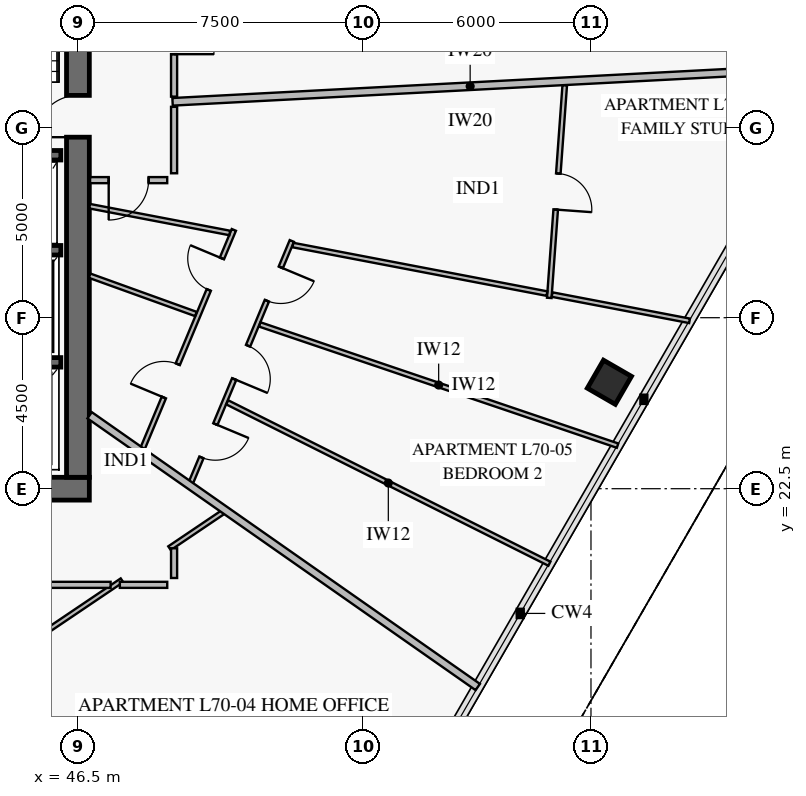
"""IFC4 building model, lengths in metres.
Left out: names, types, materials, properties, quantities, classifications, styles, units other than length and angle.
Written with IfcOpenShell. Run it as: python <this file> out.ifc"""

import sys

from ifc_helpers import new_model, si_unit, direction, frame, frame_2d, origin, origin_2d, place, context, subcontext, project, spatial, rectangle, extrude, element, fill, save


model = new_model("IFC4")
c1 = context("Model", 3, precision=1e-05, world=origin(), true_north=direction((0.0, 1.0)))
c2 = subcontext(c1, "Body", "Model", "MODEL_VIEW")
j1 = project(units=[si_unit("LENGTHUNIT", "METRE"), si_unit("PLANEANGLEUNIT", "RADIAN")], contexts=[c1])
p1 = place(None, origin())
s1 = spatial("IfcSite", under=j1, at=p1, CompositionType="ELEMENT")
p2 = place(p1, origin())
s2 = spatial("IfcBuilding", under=s1, at=p2, CompositionType="ELEMENT")
p3 = place(p2, frame((0.0, 0.0, 276.8)))
s3 = spatial("IfcBuildingStorey", under=s2, at=p3, CompositionType="ELEMENT", Elevation=276.8)
p4 = place(p3, frame((37.35, 22.5, 0.0), z_axis=(0.0, 0.0, 1.0), x_axis=(1.0, 0.0, 0.0)))
e1 = element("IfcWall", 1, at=p4, inside=s3, PredefinedType="SHEAR", context=c2, shape_type="SweptSolid", body=[
    extrude(rectangle(XDim=9.45, YDim=0.6, at=frame_2d((4.725, 0.0))), origin(), (0.0, 0.0, 1.0), 3.8),
])
p5 = place(p4, frame((3.95, 0.0, 0.0)))
e2 = element("IfcOpeningElement", 2, at=p5, cuts=e1, PredefinedType="OPENING", context=c2, shape_type="SweptSolid", body=[
    extrude(rectangle(XDim=1.5, YDim=2.15, at=frame_2d((0.75, 1.075))), frame((0.0, 0.312, 0.0), z_axis=(0.0, -1.0, 0.0), x_axis=(1.0, 0.0, 0.0)), (0.0, 0.0, 1.0), 0.624),
])
p6 = place(p3, frame((46.5, 22.8, 0.0), z_axis=(0.0, 0.0, 1.0), x_axis=(0.0, 1.0, 0.0)))
e3 = element("IfcWall", 3, at=p6, inside=s3, PredefinedType="SHEAR", context=c2, shape_type="SweptSolid", body=[
    extrude(rectangle(XDim=18.4, YDim=0.6, at=frame_2d((9.2, 0.0))), origin(), (0.0, 0.0, 1.0), 3.8),
])
p7 = place(p6, frame((8.95, 0.0, 0.0)))
e4 = element("IfcOpeningElement", 4, at=p7, cuts=e3, PredefinedType="OPENING", context=c2, shape_type="SweptSolid", body=[
    extrude(rectangle(XDim=1.1, YDim=2.15, at=frame_2d((0.55, 1.075))), frame((0.0, 0.312, 0.0), z_axis=(0.0, -1.0, 0.0), x_axis=(1.0, 0.0, 0.0)), (0.0, 0.0, 1.0), 0.624),
])
p8 = place(p3, frame((60.485, 25.301, 0.0), z_axis=(0.0, 0.0, 1.0), x_axis=(0.5, 0.866025403784, 0.0)))
e5 = element("IfcColumn", 5, at=p8, inside=s3, PredefinedType="COLUMN", context=c2, shape_type="SweptSolid", body=[
    extrude(rectangle(XDim=0.85, YDim=0.85, at=origin_2d()), origin(), (0.0, 0.0, 1.0), 3.55),
])
p9 = place(p3, frame((25.95, 31.275, 0.0), z_axis=(0.0, 0.0, 1.0), x_axis=(1.0, 0.0, 0.0)))
e6 = element("IfcWall", 6, at=p9, inside=s3, PredefinedType="SOLIDWALL", context=c2, shape_type="SweptSolid", body=[
    extrude(rectangle(XDim=20.1, YDim=0.25, at=frame_2d((10.05, 0.0))), origin(), (0.0, 0.0, 1.0), 3.8),
])
p10 = place(p9, frame((2.6, 0.0, 0.0)))
e7 = element("IfcOpeningElement", 7, at=p10, cuts=e6, PredefinedType="OPENING", context=c2, shape_type="SweptSolid", body=[
    extrude(rectangle(XDim=1.1, YDim=2.15, at=frame_2d((0.55, 1.075))), frame((0.0, 0.137, 0.0), z_axis=(0.0, -1.0, 0.0), x_axis=(1.0, 0.0, 0.0)), (0.0, 0.0, 1.0), 0.274),
])
p11 = place(p9, frame((10.6, 0.0, 0.0)))
e8 = element("IfcOpeningElement", 8, at=p11, cuts=e6, PredefinedType="OPENING", context=c2, shape_type="SweptSolid", body=[
    extrude(rectangle(XDim=1.1, YDim=2.15, at=frame_2d((0.55, 1.075))), frame((0.0, 0.137, 0.0), z_axis=(0.0, -1.0, 0.0), x_axis=(1.0, 0.0, 0.0)), (0.0, 0.0, 1.0), 0.274),
])
p12 = place(p9, frame((16.35, 0.0, 0.0)))
e9 = element("IfcOpeningElement", 9, at=p12, cuts=e6, PredefinedType="OPENING", context=c2, shape_type="SweptSolid", body=[
    extrude(rectangle(XDim=1.1, YDim=2.15, at=frame_2d((0.55, 1.075))), frame((0.0, 0.137, 0.0), z_axis=(0.0, -1.0, 0.0), x_axis=(1.0, 0.0, 0.0)), (0.0, 0.0, 1.0), 0.274),
])
for number, where, z_axis, x_axis in (
    (10, (43.8, 25.825, 0.0), (0.0, 0.0, 1.0), (1.0, 0.0, 0.0)),
    (11, (43.8, 28.775, 0.0), (0.0, 0.0, 1.0), (1.0, 0.0, 0.0)),
):
    element("IfcWall", number, at=place(p3, frame(where, z_axis=z_axis, x_axis=x_axis)), inside=s3, PredefinedType="SOLIDWALL", context=c2, shape_type="SweptSolid", body=[
        extrude(rectangle(XDim=2.25, YDim=0.25, at=frame_2d((1.125, 0.0))), origin(), (0.0, 0.0, 1.0), 3.8),
    ])
p13 = place(p3, frame((44.01, 17.598, 0.0), z_axis=(0.0, 0.0, 1.0), x_axis=(0.486020933701, -0.873947167742, 0.0)))
e12 = element("IfcWall", 12, at=p13, inside=s3, PredefinedType="PARTITIONING", context=c2, shape_type="SweptSolid", body=[
    extrude(rectangle(XDim=8.828, YDim=0.12, at=frame_2d((4.414, 0.0))), origin(), (0.0, 0.0, 1.0), 2.93),
])
p14 = place(p13, frame((3.914, 0.0, 0.0)))
e13 = element("IfcOpeningElement", 13, at=p14, cuts=e12, PredefinedType="OPENING", context=c2, shape_type="SweptSolid", body=[
    extrude(rectangle(XDim=0.95, YDim=2.1, at=frame_2d((0.475, 1.05))), frame((0.0, 0.072, 0.0), z_axis=(0.0, -1.0, 0.0), x_axis=(1.0, 0.0, 0.0)), (0.0, 0.0, 1.0), 0.144),
])
p15 = place(p3, frame((58.903, 27.521, 0.0), z_axis=(0.0, 0.0, 1.0), x_axis=(0.072523893028, 0.99736667527, 0.0)))
e14 = element("IfcWall", 14, at=p15, inside=s3, PredefinedType="PARTITIONING", context=c2, shape_type="SweptSolid", body=[
    extrude(rectangle(XDim=5.612, YDim=0.12, at=frame_2d((2.806, 0.0))), origin(), (0.0, 0.0, 1.0), 3.55),
])
p16 = place(p15, frame((2.331, 0.0, 0.0)))
e15 = element("IfcOpeningElement", 15, at=p16, cuts=e14, PredefinedType="OPENING", context=c2, shape_type="SweptSolid", body=[
    extrude(rectangle(XDim=0.95, YDim=2.1, at=frame_2d((0.475, 1.05))), frame((0.0, 0.072, 0.0), z_axis=(0.0, -1.0, 0.0), x_axis=(1.0, 0.0, 0.0)), (0.0, 0.0, 1.0), 0.144),
])
p17 = place(p3, frame((48.18, 23.508, 0.0), z_axis=(0.0, 0.0, 1.0), x_axis=(0.385271359417, 0.922803326616, 0.0)))
e16 = element("IfcWall", 16, at=p17, inside=s3, PredefinedType="PARTITIONING", context=c2, shape_type="SweptSolid", body=[
    extrude(rectangle(XDim=6.289, YDim=0.12, at=frame_2d((3.144, 0.0))), origin(), (0.0, 0.0, 1.0), 2.95),
])
p18 = place(p17, frame((1.508, 0.0, 0.0)))
e17 = element("IfcOpeningElement", 17, at=p18, cuts=e16, PredefinedType="OPENING", context=c2, shape_type="SweptSolid", body=[
    extrude(rectangle(XDim=0.95, YDim=2.1, at=frame_2d((0.475, 1.05))), frame((0.0, 0.072, 0.0), z_axis=(0.0, -1.0, 0.0), x_axis=(1.0, 0.0, 0.0)), (0.0, 0.0, 1.0), 0.144),
])
p19 = place(p17, frame((4.575, 0.0, 0.0)))
e18 = element("IfcOpeningElement", 18, at=p19, cuts=e16, PredefinedType="OPENING", context=c2, shape_type="SweptSolid", body=[
    extrude(rectangle(XDim=0.9, YDim=2.1, at=frame_2d((0.45, 1.05))), frame((0.0, 0.072, 0.0), z_axis=(0.0, -1.0, 0.0), x_axis=(1.0, 0.0, 0.0)), (0.0, 0.0, 1.0), 0.144),
])
p20 = place(p3, frame((49.46, 22.628, 0.0), z_axis=(0.0, 0.0, 1.0), x_axis=(0.385248544759, 0.922812851428, 0.0)))
e19 = element("IfcWall", 19, at=p20, inside=s3, PredefinedType="PARTITIONING", context=c2, shape_type="SweptSolid", body=[
    extrude(rectangle(XDim=6.926, YDim=0.12, at=frame_2d((3.463, 0.0))), origin(), (0.0, 0.0, 1.0), 2.95),
])
p21 = place(p20, frame((0.753, 0.0, 0.0)))
e20 = element("IfcOpeningElement", 20, at=p21, cuts=e19, PredefinedType="OPENING", context=c2, shape_type="SweptSolid", body=[
    extrude(rectangle(XDim=0.95, YDim=2.1, at=frame_2d((0.475, 1.05))), frame((0.0, 0.072, 0.0), z_axis=(0.0, -1.0, 0.0), x_axis=(1.0, 0.0, 0.0)), (0.0, 0.0, 1.0), 0.144),
])
p22 = place(p20, frame((2.988, 0.0, 0.0)))
e21 = element("IfcOpeningElement", 21, at=p22, cuts=e19, PredefinedType="OPENING", context=c2, shape_type="SweptSolid", body=[
    extrude(rectangle(XDim=0.95, YDim=2.1, at=frame_2d((0.475, 1.05))), frame((0.0, 0.072, 0.0), z_axis=(0.0, -1.0, 0.0), x_axis=(1.0, 0.0, 0.0)), (0.0, 0.0, 1.0), 0.144),
])
p23 = place(p20, frame((5.222, 0.0, 0.0)))
e22 = element("IfcOpeningElement", 22, at=p23, cuts=e19, PredefinedType="OPENING", context=c2, shape_type="SweptSolid", body=[
    extrude(rectangle(XDim=0.95, YDim=2.1, at=frame_2d((0.475, 1.05))), frame((0.0, 0.072, 0.0), z_axis=(0.0, -1.0, 0.0), x_axis=(1.0, 0.0, 0.0)), (0.0, 0.0, 1.0), 0.144),
])
p24 = place(p3, frame((46.82, 30.62, 0.0), z_axis=(0.0, 0.0, 1.0), x_axis=(1.0, 0.0, 0.0)))
e23 = element("IfcWall", 23, at=p24, inside=s3, PredefinedType="PARTITIONING", context=c2, shape_type="SweptSolid", body=[
    extrude(rectangle(XDim=2.029, YDim=0.16, at=frame_2d((1.015, 0.0))), origin(), (0.0, 0.0, 1.0), 3.55),
])
p25 = place(p24, frame((0.49, 0.0, 0.0)))
e24 = element("IfcOpeningElement", 24, at=p25, cuts=e23, PredefinedType="OPENING", context=c2, shape_type="SweptSolid", body=[
    extrude(rectangle(XDim=1.05, YDim=2.15, at=frame_2d((0.525, 1.075))), frame((0.0, 0.092, 0.0), z_axis=(0.0, -1.0, 0.0), x_axis=(1.0, 0.0, 0.0)), (0.0, 0.0, 1.0), 0.184),
])
p26 = place(p3, frame((49.03, 32.817, 0.0), z_axis=(0.0, 0.0, 1.0), x_axis=(0.0, 1.0, 0.0)))
e25 = element("IfcWall", 25, at=p26, inside=s3, PredefinedType="PARTITIONING", context=c2, shape_type="SweptSolid", body=[
    extrude(rectangle(XDim=3.285, YDim=0.16, at=frame_2d((1.643, 0.0))), origin(), (0.0, 0.0, 1.0), 2.95),
])
p27 = place(p26, frame((1.118, 0.0, 0.0)))
e26 = element("IfcOpeningElement", 26, at=p27, cuts=e25, PredefinedType="OPENING", context=c2, shape_type="SweptSolid", body=[
    extrude(rectangle(XDim=1.05, YDim=2.15, at=frame_2d((0.525, 1.075))), frame((0.0, 0.092, 0.0), z_axis=(0.0, -1.0, 0.0), x_axis=(1.0, 0.0, 0.0)), (0.0, 0.0, 1.0), 0.184),
])
p28 = place(p3, frame((44.054, 17.658, 0.0), z_axis=(0.0, 0.0, 1.0), x_axis=(0.829023707323, 0.559213458973, 0.0)))
e27 = element("IfcWall", 27, at=p28, inside=s3, PredefinedType="PARTITIONING", context=c2, shape_type="SweptSolid", body=[
    extrude(rectangle(XDim=4.349, YDim=0.12, at=frame_2d((2.174, 0.0))), origin(), (0.0, 0.0, 1.0), 3.55),
])
p29 = place(p3, frame((48.91, 20.934, 0.0), z_axis=(0.0, 0.0, 1.0), x_axis=(0.829049195255, 0.559175671723, 0.0)))
e28 = element("IfcWall", 28, at=p29, inside=s3, PredefinedType="PARTITIONING", context=c2, shape_type="SweptSolid", body=[
    extrude(rectangle(XDim=1.721, YDim=0.12, at=frame_2d((0.861, 0.0))), origin(), (0.0, 0.0, 1.0), 3.55),
])
p30 = place(p3, frame((46.808, 24.432, 0.0), z_axis=(0.0, 0.0, 1.0), x_axis=(0.819149112162, -0.57358062384, 0.0)))
e29 = element("IfcWall", 29, at=p30, inside=s3, PredefinedType="PARTITIONING", context=c2, shape_type="SweptSolid", body=[
    extrude(rectangle(XDim=12.467, YDim=0.2, at=frame_2d((6.233, 0.0))), origin(), (0.0, 0.0, 1.0), 2.93),
])
p31 = place(p3, frame((46.808, 28.105, 0.0), z_axis=(0.0, 0.0, 1.0), x_axis=(0.940760677373, -0.339071302101, 0.0)))
e30 = element("IfcWall", 30, at=p31, inside=s3, PredefinedType="PARTITIONING", context=c2, shape_type="SweptSolid", body=[
    extrude(rectangle(XDim=2.973, YDim=0.12, at=frame_2d((1.486, 0.0))), origin(), (0.0, 0.0, 1.0), 3.55),
])
p32 = place(p3, frame((50.429, 24.772, 0.0), z_axis=(0.0, 0.0, 1.0), x_axis=(0.894097326917, -0.447872716294, 0.0)))
e31 = element("IfcWall", 31, at=p32, inside=s3, PredefinedType="PARTITIONING", context=c2, shape_type="SweptSolid", body=[
    extrude(rectangle(XDim=9.48, YDim=0.12, at=frame_2d((4.74, 0.0))), origin(), (0.0, 0.0, 1.0), 2.93),
])
p33 = place(p3, frame((51.285, 26.823, 0.0), z_axis=(0.0, 0.0, 1.0), x_axis=(0.947134584663, -0.320836529302, 0.0)))
e32 = element("IfcWall", 32, at=p33, inside=s3, PredefinedType="PARTITIONING", context=c2, shape_type="SweptSolid", body=[
    extrude(rectangle(XDim=9.94, YDim=0.12, at=frame_2d((4.97, 0.0))), origin(), (0.0, 0.0, 1.0), 2.93),
])
p34 = place(p3, frame((46.808, 29.934, 0.0), z_axis=(0.0, 0.0, 1.0), x_axis=(0.982225672126, -0.187703833251, 0.0)))
e33 = element("IfcWall", 33, at=p34, inside=s3, PredefinedType="PARTITIONING", context=c2, shape_type="SweptSolid", body=[
    extrude(rectangle(XDim=3.754, YDim=0.12, at=frame_2d((1.877, 0.0))), origin(), (0.0, 0.0, 1.0), 3.55),
])
p35 = place(p3, frame((52.157, 28.912, 0.0), z_axis=(0.0, 0.0, 1.0), x_axis=(0.982220961198, -0.187728483144, 0.0)))
e34 = element("IfcWall", 34, at=p35, inside=s3, PredefinedType="PARTITIONING", context=c2, shape_type="SweptSolid", body=[
    extrude(rectangle(XDim=6.807, YDim=0.12, at=frame_2d((3.403, 0.0))), origin(), (0.0, 0.0, 1.0), 3.55),
])
p36 = place(p3, frame((58.977, 27.609, 0.0), z_axis=(0.0, 0.0, 1.0), x_axis=(0.982222884099, -0.187718421986, 0.0)))
e35 = element("IfcWall", 35, at=p36, inside=s3, PredefinedType="PARTITIONING", context=c2, shape_type="SweptSolid", body=[
    extrude(rectangle(XDim=3.682, YDim=0.12, at=frame_2d((1.841, 0.0))), origin(), (0.0, 0.0, 1.0), 2.93),
])
p37 = place(p3, frame((48.99, 32.681, 0.0), z_axis=(0.0, 0.0, 1.0), x_axis=(0.998629458789, 0.052337405734, 0.0)))
e36 = element("IfcWall", 36, at=p37, inside=s3, PredefinedType="PARTITIONING", context=c2, shape_type="SweptSolid", body=[
    extrude(rectangle(XDim=15.683, YDim=0.2, at=frame_2d((7.841, 0.0))), origin(), (0.0, 0.0, 1.0), 2.93),
])
p38 = place(p3, frame((42.768, 19.97, 0.0), z_axis=(0.0, 0.0, 1.0), x_axis=(1.0, 0.0, 0.0)))
e37 = element("IfcWall", 37, at=p38, inside=s3, PredefinedType="PARTITIONING", context=c2, shape_type="SweptSolid", body=[
    extrude(rectangle(XDim=4.592, YDim=0.16, at=frame_2d((2.296, 0.0))), origin(), (0.0, 0.0, 1.0), 3.55),
])
p39 = place(p3, frame((47.603, 19.97, 0.0), z_axis=(0.0, 0.0, 1.0), x_axis=(1.0, 0.0, 0.0)))
e38 = element("IfcWall", 38, at=p39, inside=s3, PredefinedType="PARTITIONING", context=c2, shape_type="SweptSolid", body=[
    extrude(rectangle(XDim=1.247, YDim=0.16, at=frame_2d((0.624, 0.0))), origin(), (0.0, 0.0, 1.0), 2.95),
])
p40 = place(p3, frame((49.03, 20.15, 0.0), z_axis=(0.0, 0.0, 1.0), x_axis=(0.0, 1.0, 0.0)))
e39 = element("IfcWall", 39, at=p40, inside=s3, PredefinedType="PARTITIONING", context=c2, shape_type="SweptSolid", body=[
    extrude(rectangle(XDim=0.783, YDim=0.16, at=frame_2d((0.391, 0.0))), origin(), (0.0, 0.0, 1.0), 3.55),
])
p41 = place(p3, frame((49.03, 30.801, 0.0), z_axis=(0.0, 0.0, 1.0), x_axis=(0.0, 1.0, 0.0)))
e40 = element("IfcWall", 40, at=p41, inside=s3, PredefinedType="PARTITIONING", context=c2, shape_type="SweptSolid", body=[
    extrude(rectangle(XDim=1.748, YDim=0.16, at=frame_2d((0.874, 0.0))), origin(), (0.0, 0.0, 1.0), 3.55),
])
p42 = place(p7, origin())
e41 = element("IfcDoor", 41, at=p42, inside=s3, OperationType="SINGLE_SWING_LEFT", PredefinedType="USERDEFINED", context=c2, shape_type="SweptSolid", body=[
    extrude(rectangle(XDim=1.1, YDim=2.15, at=frame_2d((0.55, 1.075))), frame((0.0, 0.025, 0.0), z_axis=(0.0, -1.0, 0.0), x_axis=(1.0, 0.0, 0.0)), (0.0, 0.0, 1.0), 0.05),
])
fill(e4, e41)
p43 = place(p16, frame((0.95, 0.0, 0.0), z_axis=(0.0, 0.0, 1.0), x_axis=(-1.0, 0.0, 0.0)))
e42 = element("IfcDoor", 42, at=p43, inside=s3, OperationType="SINGLE_SWING_RIGHT", PredefinedType="DOOR", context=c2, shape_type="SweptSolid", body=[
    extrude(rectangle(XDim=0.95, YDim=2.1, at=frame_2d((0.475, 1.05))), frame((0.0, 0.025, 0.0), z_axis=(0.0, -1.0, 0.0), x_axis=(1.0, 0.0, 0.0)), (0.0, 0.0, 1.0), 0.05),
])
fill(e15, e42)
p44 = place(p18, origin())
e43 = element("IfcDoor", 43, at=p44, inside=s3, OperationType="SINGLE_SWING_LEFT", PredefinedType="DOOR", context=c2, shape_type="SweptSolid", body=[
    extrude(rectangle(XDim=0.95, YDim=2.1, at=frame_2d((0.475, 1.05))), frame((0.0, 0.025, 0.0), z_axis=(0.0, -1.0, 0.0), x_axis=(1.0, 0.0, 0.0)), (0.0, 0.0, 1.0), 0.05),
])
fill(e17, e43)
p45 = place(p19, origin())
e44 = element("IfcDoor", 44, at=p45, inside=s3, OperationType="SINGLE_SWING_RIGHT", PredefinedType="DOOR", context=c2, shape_type="SweptSolid", body=[
    extrude(rectangle(XDim=0.9, YDim=2.1, at=frame_2d((0.45, 1.05))), frame((0.0, 0.025, 0.0), z_axis=(0.0, -1.0, 0.0), x_axis=(1.0, 0.0, 0.0)), (0.0, 0.0, 1.0), 0.05),
])
fill(e18, e44)
p46 = place(p21, frame((0.95, 0.0, 0.0), z_axis=(0.0, 0.0, 1.0), x_axis=(-1.0, 0.0, 0.0)))
e45 = element("IfcDoor", 45, at=p46, inside=s3, OperationType="SINGLE_SWING_LEFT", PredefinedType="DOOR", context=c2, shape_type="SweptSolid", body=[
    extrude(rectangle(XDim=0.95, YDim=2.1, at=frame_2d((0.475, 1.05))), frame((0.0, 0.025, 0.0), z_axis=(0.0, -1.0, 0.0), x_axis=(1.0, 0.0, 0.0)), (0.0, 0.0, 1.0), 0.05),
])
fill(e20, e45)
p47 = place(p22, frame((0.95, 0.0, 0.0), z_axis=(0.0, 0.0, 1.0), x_axis=(-1.0, 0.0, 0.0)))
e46 = element("IfcDoor", 46, at=p47, inside=s3, OperationType="SINGLE_SWING_RIGHT", PredefinedType="DOOR", context=c2, shape_type="SweptSolid", body=[
    extrude(rectangle(XDim=0.95, YDim=2.1, at=frame_2d((0.475, 1.05))), frame((0.0, 0.025, 0.0), z_axis=(0.0, -1.0, 0.0), x_axis=(1.0, 0.0, 0.0)), (0.0, 0.0, 1.0), 0.05),
])
fill(e21, e46)
p48 = place(p23, frame((0.95, 0.0, 0.0), z_axis=(0.0, 0.0, 1.0), x_axis=(-1.0, 0.0, 0.0)))
e47 = element("IfcDoor", 47, at=p48, inside=s3, OperationType="SINGLE_SWING_LEFT", PredefinedType="DOOR", context=c2, shape_type="SweptSolid", body=[
    extrude(rectangle(XDim=0.95, YDim=2.1, at=frame_2d((0.475, 1.05))), frame((0.0, 0.025, 0.0), z_axis=(0.0, -1.0, 0.0), x_axis=(1.0, 0.0, 0.0)), (0.0, 0.0, 1.0), 0.05),
])
fill(e22, e47)
p49 = place(p25, frame((1.05, 0.0, 0.0), z_axis=(0.0, 0.0, 1.0), x_axis=(-1.0, 0.0, 0.0)))
e48 = element("IfcDoor", 48, at=p49, inside=s3, OperationType="SINGLE_SWING_RIGHT", PredefinedType="DOOR", context=c2, shape_type="SweptSolid", body=[
    extrude(rectangle(XDim=1.05, YDim=2.15, at=frame_2d((0.525, 1.075))), frame((0.0, 0.025, 0.0), z_axis=(0.0, -1.0, 0.0), x_axis=(1.0, 0.0, 0.0)), (0.0, 0.0, 1.0), 0.05),
])
fill(e24, e48)
p50 = place(p27, frame((1.05, 0.0, 0.0), z_axis=(0.0, 0.0, 1.0), x_axis=(-1.0, 0.0, 0.0)))
e49 = element("IfcDoor", 49, at=p50, inside=s3, OperationType="SINGLE_SWING_RIGHT", PredefinedType="DOOR", context=c2, shape_type="SweptSolid", body=[
    extrude(rectangle(XDim=1.05, YDim=2.15, at=frame_2d((0.525, 1.075))), frame((0.0, 0.025, 0.0), z_axis=(0.0, -1.0, 0.0), x_axis=(1.0, 0.0, 0.0)), (0.0, 0.0, 1.0), 0.05),
])
fill(e26, e49)
save(model, sys.argv[1])
